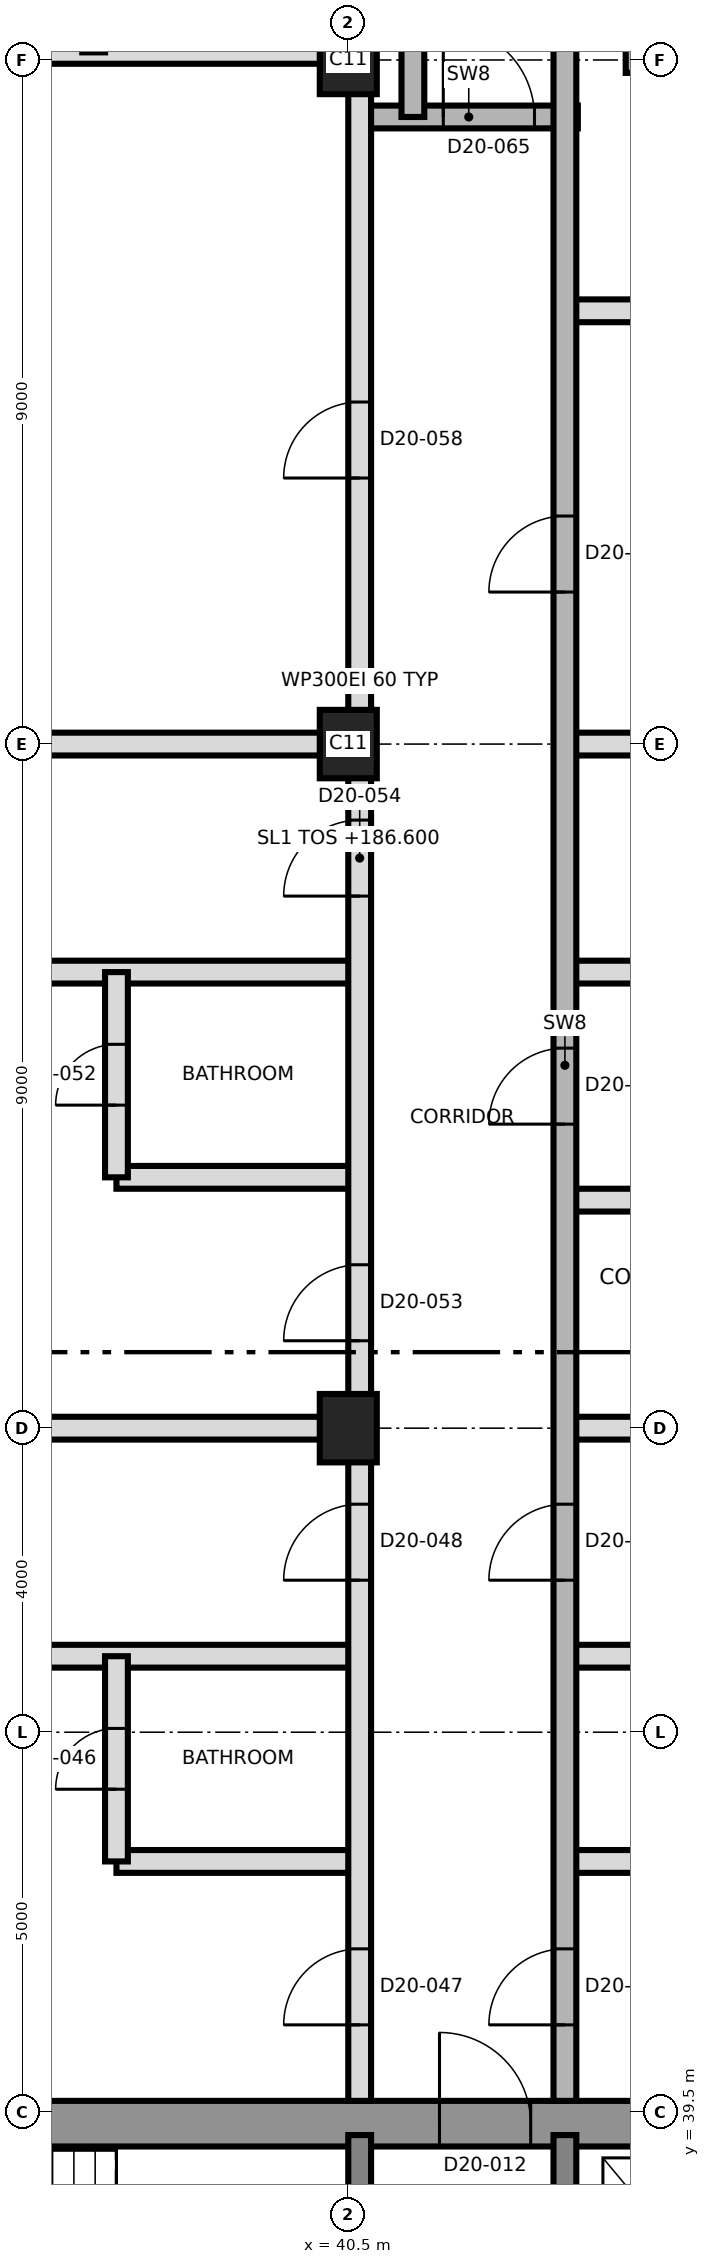
"""IFC4 building model, lengths in metres.
Left out: names, types, materials, properties, quantities, classifications, styles, units other than length and angle.
Written with IfcOpenShell. Run it as: python <this file> out.ifc"""

import sys

from ifc_helpers import new_model, si_unit, direction, frame, frame_2d, origin, origin_2d, place, context, subcontext, project, spatial, rectangle, extrude, element, fill, save


model = new_model("IFC4")
c1 = context("Model", 3, precision=1e-05, world=origin(), true_north=direction((0.0, 1.0)))
c2 = subcontext(c1, "Body", "Model", "MODEL_VIEW")
j1 = project(units=[si_unit("LENGTHUNIT", "METRE"), si_unit("PLANEANGLEUNIT", "RADIAN")], contexts=[c1])
p1 = place(None, origin())
s1 = spatial("IfcSite", under=j1, at=p1, CompositionType="ELEMENT")
p2 = place(p1, origin())
s2 = spatial("IfcBuilding", under=s1, at=p2, CompositionType="ELEMENT")
p3 = place(p2, frame((0.0, 0.0, 186.6)))
s3 = spatial("IfcBuildingStorey", under=s2, at=p3, CompositionType="ELEMENT", Elevation=186.6)
p4 = place(p3, frame((31.2, 39.35, 0.0), z_axis=(0.0, 0.0, 1.0), x_axis=(1.0, 0.0, 0.0)))
e1 = element("IfcWall", 1, at=p4, inside=s3, PredefinedType="SHEAR", context=c2, shape_type="SweptSolid", body=[
    extrude(rectangle(XDim=27.0, YDim=0.6, at=frame_2d((13.5, 0.0))), origin(), (0.0, 0.0, 1.0), 3.7),
])
p5 = place(p4, frame((10.5, 0.0, 0.0)))
e2 = element("IfcOpeningElement", 2, at=p5, cuts=e1, PredefinedType="OPENING", context=c2, shape_type="SweptSolid", body=[
    extrude(rectangle(XDim=1.2, YDim=2.1, at=frame_2d((0.6, 1.05))), frame((0.0, 0.31, 0.0), z_axis=(0.0, -1.0, 0.0), x_axis=(1.0, 0.0, 0.0)), (0.0, 0.0, 1.0), 0.62),
])
for number, where, z_axis, x_axis in (
    (3, (40.65, 33.5, 0.0), (0.0, 0.0, 1.0), (0.0, 1.0, 0.0)),
    (4, (43.35, 33.5, 0.0), (0.0, 0.0, 1.0), (0.0, 1.0, 0.0)),
):
    element("IfcWall", number, at=place(p3, frame(where, z_axis=z_axis, x_axis=x_axis)), inside=s3, PredefinedType="SHEAR", context=c2, shape_type="SweptSolid", body=[
        extrude(rectangle(XDim=5.7, YDim=0.3, at=frame_2d((2.85, 0.0))), origin(), (0.0, 0.0, 1.0), 3.7),
    ])
for number, where, z_axis, x_axis in (
    (5, (40.5, 48.5, 0.0), (0.0, 0.0, 1.0), (0.0, 1.0, 0.0)),
    (6, (40.5, 57.5, 0.0), (0.0, 0.0, 1.0), (0.0, 1.0, 0.0)),
    (7, (40.5, 66.5, 0.0), (0.0, 0.0, 1.0), (0.0, 1.0, 0.0)),
):
    element("IfcColumn", number, at=place(p3, frame(where, z_axis=z_axis, x_axis=x_axis)), inside=s3, PredefinedType="COLUMN", context=c2, shape_type="SweptSolid", body=[
        extrude(rectangle(XDim=0.9, YDim=0.75, at=origin_2d()), origin(), (0.0, 0.0, 1.0), 3.7),
    ])
for number, where, z_axis, x_axis in (
    (8, (37.45, 42.8, 0.0), (0.0, 0.0, 1.0), (1.0, 0.0, 0.0)),
    (9, (43.35, 42.8, 0.0), (0.0, 0.0, 1.0), (1.0, 0.0, 0.0)),
):
    element("IfcWall", number, at=place(p3, frame(where, z_axis=z_axis, x_axis=x_axis)), inside=s3, PredefinedType="PARTITIONING", context=c2, shape_type="SweptSolid", body=[
        extrude(rectangle(XDim=3.2, YDim=0.3, at=frame_2d((1.6, 0.0))), origin(), (0.0, 0.0, 1.0), 3.4),
    ])
p6 = place(p3, frame((29.17, 45.5, 0.0), z_axis=(0.0, 0.0, 1.0), x_axis=(1.0, 0.0, 0.0)))
e10 = element("IfcWall", 10, at=p6, inside=s3, PredefinedType="PARTITIONING", context=c2, shape_type="SweptSolid", body=[
    extrude(rectangle(XDim=11.48, YDim=0.3, at=frame_2d((5.74, 0.0))), origin(), (0.0, 0.0, 1.0), 3.35),
])
p7 = place(p3, frame((43.35, 45.5, 0.0), z_axis=(0.0, 0.0, 1.0), x_axis=(1.0, 0.0, 0.0)))
e11 = element("IfcWall", 11, at=p7, inside=s3, PredefinedType="PARTITIONING", context=c2, shape_type="SweptSolid", body=[
    extrude(rectangle(XDim=8.66, YDim=0.3, at=frame_2d((4.33, 0.0))), origin(), (0.0, 0.0, 1.0), 3.35),
])
p8 = place(p3, frame((29.17, 48.5, 0.0), z_axis=(0.0, 0.0, 1.0), x_axis=(1.0, 0.0, 0.0)))
e12 = element("IfcWall", 12, at=p8, inside=s3, PredefinedType="PARTITIONING", context=c2, shape_type="SweptSolid", body=[
    extrude(rectangle(XDim=11.48, YDim=0.3, at=frame_2d((5.74, 0.0))), origin(), (0.0, 0.0, 1.0), 3.35),
])
p9 = place(p3, frame((43.35, 48.5, 0.0), z_axis=(0.0, 0.0, 1.0), x_axis=(1.0, 0.0, 0.0)))
e13 = element("IfcWall", 13, at=p9, inside=s3, PredefinedType="PARTITIONING", context=c2, shape_type="SweptSolid", body=[
    extrude(rectangle(XDim=8.66, YDim=0.3, at=frame_2d((4.33, 0.0))), origin(), (0.0, 0.0, 1.0), 3.35),
])
p10 = place(p3, frame((43.35, 51.5, 0.0), z_axis=(0.0, 0.0, 1.0), x_axis=(1.0, 0.0, 0.0)))
e14 = element("IfcWall", 14, at=p10, inside=s3, PredefinedType="PARTITIONING", context=c2, shape_type="SweptSolid", body=[
    extrude(rectangle(XDim=3.3, YDim=0.3, at=frame_2d((1.65, 0.0))), origin(), (0.0, 0.0, 1.0), 3.4),
])
p11 = place(p3, frame((37.45, 51.8, 0.0), z_axis=(0.0, 0.0, 1.0), x_axis=(1.0, 0.0, 0.0)))
e15 = element("IfcWall", 15, at=p11, inside=s3, PredefinedType="PARTITIONING", context=c2, shape_type="SweptSolid", body=[
    extrude(rectangle(XDim=3.2, YDim=0.3, at=frame_2d((1.6, 0.0))), origin(), (0.0, 0.0, 1.0), 3.4),
])
p12 = place(p3, frame((29.17, 54.5, 0.0), z_axis=(0.0, 0.0, 1.0), x_axis=(1.0, 0.0, 0.0)))
e16 = element("IfcWall", 16, at=p12, inside=s3, PredefinedType="PARTITIONING", context=c2, shape_type="SweptSolid", body=[
    extrude(rectangle(XDim=11.48, YDim=0.3, at=frame_2d((5.74, 0.0))), origin(), (0.0, 0.0, 1.0), 3.35),
])
p13 = place(p3, frame((43.35, 54.5, 0.0), z_axis=(0.0, 0.0, 1.0), x_axis=(1.0, 0.0, 0.0)))
e17 = element("IfcWall", 17, at=p13, inside=s3, PredefinedType="PARTITIONING", context=c2, shape_type="SweptSolid", body=[
    extrude(rectangle(XDim=3.3, YDim=0.3, at=frame_2d((1.65, 0.0))), origin(), (0.0, 0.0, 1.0), 3.4),
])
p14 = place(p3, frame((29.17, 57.5, 0.0), z_axis=(0.0, 0.0, 1.0), x_axis=(1.0, 0.0, 0.0)))
e18 = element("IfcWall", 18, at=p14, inside=s3, PredefinedType="PARTITIONING", context=c2, shape_type="SweptSolid", body=[
    extrude(rectangle(XDim=11.48, YDim=0.3, at=frame_2d((5.74, 0.0))), origin(), (0.0, 0.0, 1.0), 3.35),
])
p15 = place(p3, frame((43.35, 57.5, 0.0), z_axis=(0.0, 0.0, 1.0), x_axis=(1.0, 0.0, 0.0)))
e19 = element("IfcWall", 19, at=p15, inside=s3, PredefinedType="PARTITIONING", context=c2, shape_type="SweptSolid", body=[
    extrude(rectangle(XDim=8.66, YDim=0.3, at=frame_2d((4.33, 0.0))), origin(), (0.0, 0.0, 1.0), 3.35),
])
p16 = place(p3, frame((43.35, 63.2, 0.0), z_axis=(0.0, 0.0, 1.0), x_axis=(1.0, 0.0, 0.0)))
e20 = element("IfcWall", 20, at=p16, inside=s3, PredefinedType="PARTITIONING", context=c2, shape_type="SweptSolid", body=[
    extrude(rectangle(XDim=8.66, YDim=0.3, at=frame_2d((4.33, 0.0))), origin(), (0.0, 0.0, 1.0), 3.35),
])
p17 = place(p16, frame((4.65, 0.0, 0.0)))
e21 = element("IfcOpeningElement", 21, at=p17, cuts=e20, PredefinedType="OPENING", context=c2, shape_type="SweptSolid", body=[
    extrude(rectangle(XDim=1.0, YDim=2.1, at=frame_2d((0.5, 1.05))), frame((0.0, 0.16, 0.0), z_axis=(0.0, -1.0, 0.0), x_axis=(1.0, 0.0, 0.0)), (0.0, 0.0, 1.0), 0.32),
])
p18 = place(p3, frame((40.65, 65.75, 0.0), z_axis=(0.0, 0.0, 1.0), x_axis=(1.0, 0.0, 0.0)))
e22 = element("IfcWall", 22, at=p18, inside=s3, PredefinedType="SHEAR", context=c2, shape_type="SweptSolid", body=[
    extrude(rectangle(XDim=2.87, YDim=0.3, at=frame_2d((1.435, 0.0))), origin(), (0.0, 0.0, 1.0), 3.35),
])
p19 = place(p18, frame((1.1, 0.0, 0.0)))
e23 = element("IfcOpeningElement", 23, at=p19, cuts=e22, PredefinedType="OPENING", context=c2, shape_type="SweptSolid", body=[
    extrude(rectangle(XDim=1.2, YDim=2.1, at=frame_2d((0.6, 1.05))), frame((0.0, 0.16, 0.0), z_axis=(0.0, -1.0, 0.0), x_axis=(1.0, 0.0, 0.0)), (0.0, 0.0, 1.0), 0.32),
])
p20 = place(p3, frame((44.18, 66.5, 0.0), z_axis=(0.0, 0.0, 1.0), x_axis=(1.0, 0.0, 0.0)))
e24 = element("IfcWall", 24, at=p20, inside=s3, PredefinedType="SOLIDWALL", context=c2, shape_type="SweptSolid", body=[
    extrude(rectangle(XDim=2.67, YDim=0.3, at=frame_2d((1.335, 0.0))), origin(), (0.0, 0.0, 1.0), 3.35),
])
p21 = place(p3, frame((29.17, 66.6, 0.0), z_axis=(0.0, 0.0, 1.0), x_axis=(1.0, 0.0, 0.0)))
e25 = element("IfcWall", 25, at=p21, inside=s3, PredefinedType="PARTITIONING", context=c2, shape_type="SweptSolid", body=[
    extrude(rectangle(XDim=11.48, YDim=0.3, at=frame_2d((5.74, 0.0))), origin(), (0.0, 0.0, 1.0), 3.35),
])
p22 = place(p21, frame((5.83, 0.0, 0.0)))
e26 = element("IfcOpeningElement", 26, at=p22, cuts=e25, PredefinedType="OPENING", context=c2, shape_type="SweptSolid", body=[
    extrude(rectangle(XDim=1.0, YDim=2.1, at=frame_2d((0.5, 1.05))), frame((0.0, 0.16, 0.0), z_axis=(0.0, -1.0, 0.0), x_axis=(1.0, 0.0, 0.0)), (0.0, 0.0, 1.0), 0.32),
])
p23 = place(p3, frame((37.45, 42.8, 0.0), z_axis=(0.0, 0.0, 1.0), x_axis=(0.0, 1.0, 0.0)))
e27 = element("IfcWall", 27, at=p23, inside=s3, PredefinedType="PARTITIONING", context=c2, shape_type="SweptSolid", body=[
    extrude(rectangle(XDim=2.7, YDim=0.3, at=frame_2d((1.35, 0.0))), origin(), (0.0, 0.0, 1.0), 3.4),
])
p24 = place(p23, frame((0.95, 0.0, 0.0)))
e28 = element("IfcOpeningElement", 28, at=p24, cuts=e27, PredefinedType="OPENING", context=c2, shape_type="SweptSolid", body=[
    extrude(rectangle(XDim=0.8, YDim=2.1, at=frame_2d((0.4, 1.05))), frame((0.0, 0.16, 0.0), z_axis=(0.0, -1.0, 0.0), x_axis=(1.0, 0.0, 0.0)), (0.0, 0.0, 1.0), 0.32),
])
p25 = place(p3, frame((37.45, 51.8, 0.0), z_axis=(0.0, 0.0, 1.0), x_axis=(0.0, 1.0, 0.0)))
e29 = element("IfcWall", 29, at=p25, inside=s3, PredefinedType="PARTITIONING", context=c2, shape_type="SweptSolid", body=[
    extrude(rectangle(XDim=2.7, YDim=0.3, at=frame_2d((1.35, 0.0))), origin(), (0.0, 0.0, 1.0), 3.4),
])
p26 = place(p25, frame((0.95, 0.0, 0.0)))
e30 = element("IfcOpeningElement", 30, at=p26, cuts=e29, PredefinedType="OPENING", context=c2, shape_type="SweptSolid", body=[
    extrude(rectangle(XDim=0.8, YDim=2.1, at=frame_2d((0.4, 1.05))), frame((0.0, 0.16, 0.0), z_axis=(0.0, -1.0, 0.0), x_axis=(1.0, 0.0, 0.0)), (0.0, 0.0, 1.0), 0.32),
])
p27 = place(p3, frame((40.65, 39.65, 0.0), z_axis=(0.0, 0.0, 1.0), x_axis=(0.0, 1.0, 0.0)))
e31 = element("IfcWall", 31, at=p27, inside=s3, PredefinedType="PARTITIONING", context=c2, shape_type="SweptSolid", body=[
    extrude(rectangle(XDim=37.35, YDim=0.3, at=frame_2d((18.675, 0.0))), origin(), (0.0, 0.0, 1.0), 3.35),
])
p28 = place(p27, frame((1.0, 0.0, 0.0)))
e32 = element("IfcOpeningElement", 32, at=p28, cuts=e31, PredefinedType="OPENING", context=c2, shape_type="SweptSolid", body=[
    extrude(rectangle(XDim=1.0, YDim=2.1, at=frame_2d((0.5, 1.05))), frame((0.0, 0.16, 0.0), z_axis=(0.0, -1.0, 0.0), x_axis=(1.0, 0.0, 0.0)), (0.0, 0.0, 1.0), 0.32),
])
p29 = place(p27, frame((6.85, 0.0, 0.0)))
e33 = element("IfcOpeningElement", 33, at=p29, cuts=e31, PredefinedType="OPENING", context=c2, shape_type="SweptSolid", body=[
    extrude(rectangle(XDim=1.0, YDim=2.1, at=frame_2d((0.5, 1.05))), frame((0.0, 0.16, 0.0), z_axis=(0.0, -1.0, 0.0), x_axis=(1.0, 0.0, 0.0)), (0.0, 0.0, 1.0), 0.32),
])
p30 = place(p27, frame((10.0, 0.0, 0.0)))
e34 = element("IfcOpeningElement", 34, at=p30, cuts=e31, PredefinedType="OPENING", context=c2, shape_type="SweptSolid", body=[
    extrude(rectangle(XDim=1.0, YDim=2.1, at=frame_2d((0.5, 1.05))), frame((0.0, 0.16, 0.0), z_axis=(0.0, -1.0, 0.0), x_axis=(1.0, 0.0, 0.0)), (0.0, 0.0, 1.0), 0.32),
])
p31 = place(p27, frame((15.85, 0.0, 0.0)))
e35 = element("IfcOpeningElement", 35, at=p31, cuts=e31, PredefinedType="OPENING", context=c2, shape_type="SweptSolid", body=[
    extrude(rectangle(XDim=1.0, YDim=2.1, at=frame_2d((0.5, 1.05))), frame((0.0, 0.16, 0.0), z_axis=(0.0, -1.0, 0.0), x_axis=(1.0, 0.0, 0.0)), (0.0, 0.0, 1.0), 0.32),
])
p32 = place(p27, frame((21.35, 0.0, 0.0)))
e36 = element("IfcOpeningElement", 36, at=p32, cuts=e31, PredefinedType="OPENING", context=c2, shape_type="SweptSolid", body=[
    extrude(rectangle(XDim=1.0, YDim=2.1, at=frame_2d((0.5, 1.05))), frame((0.0, 0.16, 0.0), z_axis=(0.0, -1.0, 0.0), x_axis=(1.0, 0.0, 0.0)), (0.0, 0.0, 1.0), 0.32),
])
p33 = place(p3, frame((41.35, 65.75, 0.0), z_axis=(0.0, 0.0, 1.0), x_axis=(0.0, 1.0, 0.0)))
e37 = element("IfcWall", 37, at=p33, inside=s3, PredefinedType="SHEAR", context=c2, shape_type="SweptSolid", body=[
    extrude(rectangle(XDim=8.85, YDim=0.3, at=frame_2d((4.425, 0.0))), origin(), (0.0, 0.0, 1.0), 3.35),
])
p34 = place(p3, frame((43.35, 39.65, 0.0), z_axis=(0.0, 0.0, 1.0), x_axis=(0.0, 1.0, 0.0)))
e38 = element("IfcWall", 38, at=p34, inside=s3, PredefinedType="SHEAR", context=c2, shape_type="SweptSolid", body=[
    extrude(rectangle(XDim=27.248, YDim=0.3, at=frame_2d((13.624, 0.0))), origin(), (0.0, 0.0, 1.0), 3.4),
])
p35 = place(p34, frame((1.0, 0.0, 0.0)))
e39 = element("IfcOpeningElement", 39, at=p35, cuts=e38, PredefinedType="OPENING", context=c2, shape_type="SweptSolid", body=[
    extrude(rectangle(XDim=1.0, YDim=2.1, at=frame_2d((0.5, 1.05))), frame((0.0, 0.16, 0.0), z_axis=(0.0, -1.0, 0.0), x_axis=(1.0, 0.0, 0.0)), (0.0, 0.0, 1.0), 0.32),
])
p36 = place(p34, frame((6.85, 0.0, 0.0)))
e40 = element("IfcOpeningElement", 40, at=p36, cuts=e38, PredefinedType="OPENING", context=c2, shape_type="SweptSolid", body=[
    extrude(rectangle(XDim=1.0, YDim=2.1, at=frame_2d((0.5, 1.05))), frame((0.0, 0.16, 0.0), z_axis=(0.0, -1.0, 0.0), x_axis=(1.0, 0.0, 0.0)), (0.0, 0.0, 1.0), 0.32),
])
p37 = place(p34, frame((12.85, 0.0, 0.0)))
e41 = element("IfcOpeningElement", 41, at=p37, cuts=e38, PredefinedType="OPENING", context=c2, shape_type="SweptSolid", body=[
    extrude(rectangle(XDim=1.0, YDim=2.1, at=frame_2d((0.5, 1.05))), frame((0.0, 0.16, 0.0), z_axis=(0.0, -1.0, 0.0), x_axis=(1.0, 0.0, 0.0)), (0.0, 0.0, 1.0), 0.32),
])
p38 = place(p34, frame((19.85, 0.0, 0.0)))
e42 = element("IfcOpeningElement", 42, at=p38, cuts=e38, PredefinedType="OPENING", context=c2, shape_type="SweptSolid", body=[
    extrude(rectangle(XDim=1.0, YDim=2.1, at=frame_2d((0.5, 1.05))), frame((0.0, 0.16, 0.0), z_axis=(0.0, -1.0, 0.0), x_axis=(1.0, 0.0, 0.0)), (0.0, 0.0, 1.0), 0.32),
])
p39 = place(p3, frame((44.3, 66.33, 0.0), z_axis=(0.0, 0.0, 1.0), x_axis=(0.0, 1.0, 0.0)))
e43 = element("IfcWall", 43, at=p39, inside=s3, PredefinedType="SHEAR", context=c2, shape_type="SweptSolid", body=[
    extrude(rectangle(XDim=8.27, YDim=0.3, at=frame_2d((4.135, 0.0))), origin(), (0.0, 0.0, 1.0), 3.35),
])
p40 = place(p5, origin())
e44 = element("IfcDoor", 44, at=p40, inside=s3, OperationType="SINGLE_SWING_RIGHT", PredefinedType="DOOR", context=c2, shape_type="SweptSolid", body=[
    extrude(rectangle(XDim=1.2, YDim=2.1, at=frame_2d((0.6, 1.05))), frame((0.0, 0.025, 0.0), z_axis=(0.0, -1.0, 0.0), x_axis=(1.0, 0.0, 0.0)), (0.0, 0.0, 1.0), 0.05),
])
fill(e2, e44)
p41 = place(p35, origin())
e45 = element("IfcDoor", 45, at=p41, inside=s3, OperationType="SINGLE_SWING_LEFT", PredefinedType="DOOR", context=c2, shape_type="SweptSolid", body=[
    extrude(rectangle(XDim=1.0, YDim=2.1, at=frame_2d((0.5, 1.05))), frame((0.0, 0.025, 0.0), z_axis=(0.0, -1.0, 0.0), x_axis=(1.0, 0.0, 0.0)), (0.0, 0.0, 1.0), 0.05),
])
fill(e39, e45)
p42 = place(p36, origin())
e46 = element("IfcDoor", 46, at=p42, inside=s3, OperationType="SINGLE_SWING_LEFT", PredefinedType="DOOR", context=c2, shape_type="SweptSolid", body=[
    extrude(rectangle(XDim=1.0, YDim=2.1, at=frame_2d((0.5, 1.05))), frame((0.0, 0.025, 0.0), z_axis=(0.0, -1.0, 0.0), x_axis=(1.0, 0.0, 0.0)), (0.0, 0.0, 1.0), 0.05),
])
fill(e40, e46)
p43 = place(p24, origin())
e47 = element("IfcDoor", 47, at=p43, inside=s3, OperationType="SINGLE_SWING_RIGHT", PredefinedType="DOOR", context=c2, shape_type="SweptSolid", body=[
    extrude(rectangle(XDim=0.8, YDim=2.1, at=frame_2d((0.4, 1.05))), frame((0.0, 0.025, 0.0), z_axis=(0.0, -1.0, 0.0), x_axis=(1.0, 0.0, 0.0)), (0.0, 0.0, 1.0), 0.05),
])
fill(e28, e47)
p44 = place(p28, origin())
e48 = element("IfcDoor", 48, at=p44, inside=s3, OperationType="SINGLE_SWING_LEFT", PredefinedType="DOOR", context=c2, shape_type="SweptSolid", body=[
    extrude(rectangle(XDim=1.0, YDim=2.1, at=frame_2d((0.5, 1.05))), frame((0.0, 0.025, 0.0), z_axis=(0.0, -1.0, 0.0), x_axis=(1.0, 0.0, 0.0)), (0.0, 0.0, 1.0), 0.05),
])
fill(e32, e48)
p45 = place(p29, origin())
e49 = element("IfcDoor", 49, at=p45, inside=s3, OperationType="SINGLE_SWING_LEFT", PredefinedType="DOOR", context=c2, shape_type="SweptSolid", body=[
    extrude(rectangle(XDim=1.0, YDim=2.1, at=frame_2d((0.5, 1.05))), frame((0.0, 0.025, 0.0), z_axis=(0.0, -1.0, 0.0), x_axis=(1.0, 0.0, 0.0)), (0.0, 0.0, 1.0), 0.05),
])
fill(e33, e49)
p46 = place(p37, origin())
e50 = element("IfcDoor", 50, at=p46, inside=s3, OperationType="SINGLE_SWING_LEFT", PredefinedType="DOOR", context=c2, shape_type="SweptSolid", body=[
    extrude(rectangle(XDim=1.0, YDim=2.1, at=frame_2d((0.5, 1.05))), frame((0.0, 0.025, 0.0), z_axis=(0.0, -1.0, 0.0), x_axis=(1.0, 0.0, 0.0)), (0.0, 0.0, 1.0), 0.05),
])
fill(e41, e50)
p47 = place(p26, origin())
e51 = element("IfcDoor", 51, at=p47, inside=s3, OperationType="SINGLE_SWING_RIGHT", PredefinedType="DOOR", context=c2, shape_type="SweptSolid", body=[
    extrude(rectangle(XDim=0.8, YDim=2.1, at=frame_2d((0.4, 1.05))), frame((0.0, 0.025, 0.0), z_axis=(0.0, -1.0, 0.0), x_axis=(1.0, 0.0, 0.0)), (0.0, 0.0, 1.0), 0.05),
])
fill(e30, e51)
p48 = place(p30, origin())
e52 = element("IfcDoor", 52, at=p48, inside=s3, OperationType="SINGLE_SWING_LEFT", PredefinedType="DOOR", context=c2, shape_type="SweptSolid", body=[
    extrude(rectangle(XDim=1.0, YDim=2.1, at=frame_2d((0.5, 1.05))), frame((0.0, 0.025, 0.0), z_axis=(0.0, -1.0, 0.0), x_axis=(1.0, 0.0, 0.0)), (0.0, 0.0, 1.0), 0.05),
])
fill(e34, e52)
p49 = place(p31, origin())
e53 = element("IfcDoor", 53, at=p49, inside=s3, OperationType="SINGLE_SWING_LEFT", PredefinedType="DOOR", context=c2, shape_type="SweptSolid", body=[
    extrude(rectangle(XDim=1.0, YDim=2.1, at=frame_2d((0.5, 1.05))), frame((0.0, 0.025, 0.0), z_axis=(0.0, -1.0, 0.0), x_axis=(1.0, 0.0, 0.0)), (0.0, 0.0, 1.0), 0.05),
])
fill(e35, e53)
p50 = place(p38, origin())
e54 = element("IfcDoor", 54, at=p50, inside=s3, OperationType="SINGLE_SWING_LEFT", PredefinedType="DOOR", context=c2, shape_type="SweptSolid", body=[
    extrude(rectangle(XDim=1.0, YDim=2.1, at=frame_2d((0.5, 1.05))), frame((0.0, 0.025, 0.0), z_axis=(0.0, -1.0, 0.0), x_axis=(1.0, 0.0, 0.0)), (0.0, 0.0, 1.0), 0.05),
])
fill(e42, e54)
p51 = place(p32, origin())
e55 = element("IfcDoor", 55, at=p51, inside=s3, OperationType="SINGLE_SWING_LEFT", PredefinedType="DOOR", context=c2, shape_type="SweptSolid", body=[
    extrude(rectangle(XDim=1.0, YDim=2.1, at=frame_2d((0.5, 1.05))), frame((0.0, 0.025, 0.0), z_axis=(0.0, -1.0, 0.0), x_axis=(1.0, 0.0, 0.0)), (0.0, 0.0, 1.0), 0.05),
])
fill(e36, e55)
p52 = place(p19, origin())
e56 = element("IfcDoor", 56, at=p52, inside=s3, OperationType="SINGLE_SWING_RIGHT", PredefinedType="DOOR", context=c2, shape_type="SweptSolid", body=[
    extrude(rectangle(XDim=1.2, YDim=2.1, at=frame_2d((0.6, 1.05))), frame((0.0, 0.025, 0.0), z_axis=(0.0, -1.0, 0.0), x_axis=(1.0, 0.0, 0.0)), (0.0, 0.0, 1.0), 0.05),
])
fill(e23, e56)
save(model, sys.argv[1])
